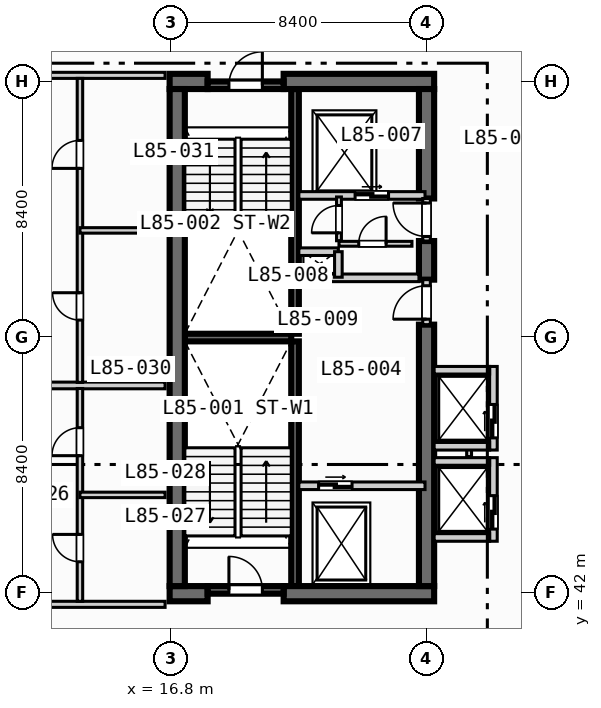
"""IFC4 building model, lengths in metres.
Left out: names, types, materials, properties, quantities, classifications, styles, units other than length and angle.
Written with IfcOpenShell. Run it as: python <this file> out.ifc"""

import sys

from ifc_helpers import new_model, si_unit, direction, frame, frame_2d, origin, place, context, subcontext, project, spatial, rectangle, extrude, element, fill, save


model = new_model("IFC4")
c1 = context("Model", 3, precision=1e-05, world=origin(), true_north=direction((0.0, 1.0)))
c2 = subcontext(c1, "Body", "Model", "MODEL_VIEW")
j1 = project(units=[si_unit("LENGTHUNIT", "METRE"), si_unit("PLANEANGLEUNIT", "RADIAN")], contexts=[c1])
p1 = place(None, origin())
s1 = spatial("IfcSite", under=j1, at=p1, CompositionType="ELEMENT")
p2 = place(p1, origin())
s2 = spatial("IfcBuilding", under=s1, at=p2, CompositionType="ELEMENT")
p3 = place(p2, frame((0.0, 0.0, 343.7)))
s3 = spatial("IfcBuildingStorey", under=s2, at=p3, CompositionType="ELEMENT", Elevation=343.7)
for number, where, z_axis, x_axis in (
    (1, (20.875, 42.2, 0.0), (0.0, 0.0, 1.0), (0.0, 1.0, 0.0)),
    (2, (20.875, 50.5, 0.0), (0.0, 0.0, 1.0), (0.0, 1.0, 0.0)),
):
    element("IfcWall", number, at=place(p3, frame(where, z_axis=z_axis, x_axis=x_axis)), inside=s3, PredefinedType="SOLIDWALL", context=c2, shape_type="SweptSolid", body=[
        extrude(rectangle(XDim=8.05, YDim=0.25, at=frame_2d((4.025, 0.0))), origin(), (0.0, 0.0, 1.0), 3.67),
    ])
p4 = place(p3, frame((17.25, 50.375, 0.0), z_axis=(0.0, 0.0, 1.0), x_axis=(1.0, 0.0, 0.0)))
e3 = element("IfcWall", 3, at=p4, inside=s3, PredefinedType="SOLIDWALL", context=c2, shape_type="SweptSolid", body=[
    extrude(rectangle(XDim=3.5, YDim=0.25, at=frame_2d((1.75, 0.0))), origin(), (0.0, 0.0, 1.0), 3.67),
])
p5 = place(p3, frame((16.75, 41.95, 0.0), z_axis=(0.0, 0.0, 1.0), x_axis=(1.0, 0.0, 0.0)))
e4 = element("IfcWall", 4, at=p5, inside=s3, PredefinedType="SHEAR", context=c2, shape_type="SweptSolid", body=[
    extrude(rectangle(XDim=1.25, YDim=0.5, at=frame_2d((0.625, 0.0))), origin(), (0.0, 0.0, 1.0), 3.67),
])
p6 = place(p3, frame((20.5, 41.95, 0.0), z_axis=(0.0, 0.0, 1.0), x_axis=(1.0, 0.0, 0.0)))
e5 = element("IfcWall", 5, at=p6, inside=s3, PredefinedType="SHEAR", context=c2, shape_type="SweptSolid", body=[
    extrude(rectangle(XDim=4.95, YDim=0.5, at=frame_2d((2.475, 0.0))), origin(), (0.0, 0.0, 1.0), 3.67),
])
p7 = place(p3, frame((16.75, 58.8, 0.0), z_axis=(0.0, 0.0, 1.0), x_axis=(1.0, 0.0, 0.0)))
e6 = element("IfcWall", 6, at=p7, inside=s3, PredefinedType="SHEAR", context=c2, shape_type="SweptSolid", body=[
    extrude(rectangle(XDim=1.25, YDim=0.5, at=frame_2d((0.625, 0.0))), origin(), (0.0, 0.0, 1.0), 3.67),
])
p8 = place(p3, frame((20.5, 58.8, 0.0), z_axis=(0.0, 0.0, 1.0), x_axis=(1.0, 0.0, 0.0)))
e7 = element("IfcWall", 7, at=p8, inside=s3, PredefinedType="SHEAR", context=c2, shape_type="SweptSolid", body=[
    extrude(rectangle(XDim=4.95, YDim=0.5, at=frame_2d((2.475, 0.0))), origin(), (0.0, 0.0, 1.0), 3.67),
])
p9 = place(p3, frame((17.0, 42.2, 0.0), z_axis=(0.0, 0.0, 1.0), x_axis=(0.0, 1.0, 0.0)))
e8 = element("IfcWall", 8, at=p9, inside=s3, PredefinedType="SHEAR", context=c2, shape_type="SweptSolid", body=[
    extrude(rectangle(XDim=16.35, YDim=0.5, at=frame_2d((8.175, 0.0))), origin(), (0.0, 0.0, 1.0), 3.67),
])
p10 = place(p3, frame((25.2, 42.2, 0.0), z_axis=(0.0, 0.0, 1.0), x_axis=(0.0, 1.0, 0.0)))
e9 = element("IfcWall", 9, at=p10, inside=s3, PredefinedType="SHEAR", context=c2, shape_type="SweptSolid", body=[
    extrude(rectangle(XDim=8.6, YDim=0.5, at=frame_2d((4.3, 0.0))), origin(), (0.0, 0.0, 1.0), 3.67),
])
p11 = place(p3, frame((25.2, 52.28, 0.0), z_axis=(0.0, 0.0, 1.0), x_axis=(0.0, 1.0, 0.0)))
e10 = element("IfcWall", 10, at=p11, inside=s3, PredefinedType="SHEAR", context=c2, shape_type="SweptSolid", body=[
    extrude(rectangle(XDim=1.27, YDim=0.5, at=frame_2d((0.635, 0.0))), origin(), (0.0, 0.0, 1.0), 3.67),
])
p12 = place(p3, frame((25.2, 54.95, 0.0), z_axis=(0.0, 0.0, 1.0), x_axis=(0.0, 1.0, 0.0)))
e11 = element("IfcWall", 11, at=p12, inside=s3, PredefinedType="SHEAR", context=c2, shape_type="SweptSolid", body=[
    extrude(rectangle(XDim=3.6, YDim=0.5, at=frame_2d((1.8, 0.0))), origin(), (0.0, 0.0, 1.0), 3.67),
])
p13 = place(p3, frame((18.0, 42.075, 0.0), z_axis=(0.0, 0.0, 1.0), x_axis=(1.0, 0.0, 0.0)))
e12 = element("IfcWall", 12, at=p13, inside=s3, PredefinedType="SOLIDWALL", context=c2, shape_type="SweptSolid", body=[
    extrude(rectangle(XDim=2.5, YDim=0.25, at=frame_2d((1.25, 0.0))), origin(), (0.0, 0.0, 1.0), 3.67),
])
p14 = place(p13, frame((0.7, 0.0, 0.0)))
e13 = element("IfcOpeningElement", 13, at=p14, cuts=e12, PredefinedType="OPENING", context=c2, shape_type="SweptSolid", body=[
    extrude(rectangle(XDim=1.1, YDim=2.15, at=frame_2d((0.55, 1.075))), frame((0.0, 0.135, 0.0), z_axis=(0.0, -1.0, 0.0), x_axis=(1.0, 0.0, 0.0)), (0.0, 0.0, 1.0), 0.27),
])
p15 = place(p3, frame((18.0, 58.675, 0.0), z_axis=(0.0, 0.0, 1.0), x_axis=(1.0, 0.0, 0.0)))
e14 = element("IfcWall", 14, at=p15, inside=s3, PredefinedType="SOLIDWALL", context=c2, shape_type="SweptSolid", body=[
    extrude(rectangle(XDim=2.5, YDim=0.25, at=frame_2d((1.25, 0.0))), origin(), (0.0, 0.0, 1.0), 3.67),
])
p16 = place(p15, frame((0.7, 0.0, 0.0)))
e15 = element("IfcOpeningElement", 15, at=p16, cuts=e14, PredefinedType="OPENING", context=c2, shape_type="SweptSolid", body=[
    extrude(rectangle(XDim=1.1, YDim=2.15, at=frame_2d((0.55, 1.075))), frame((0.0, 0.135, 0.0), z_axis=(0.0, -1.0, 0.0), x_axis=(1.0, 0.0, 0.0)), (0.0, 0.0, 1.0), 0.27),
])
p17 = place(p3, frame((21.0, 45.5, 0.0), z_axis=(0.0, 0.0, 1.0), x_axis=(1.0, 0.0, 0.0)))
e16 = element("IfcWall", 16, at=p17, inside=s3, PredefinedType="SOLIDWALL", context=c2, shape_type="SweptSolid", body=[
    extrude(rectangle(XDim=4.15, YDim=0.25, at=frame_2d((2.075, 0.0))), origin(), (0.0, 0.0, 1.0), 3.67),
])
p18 = place(p17, frame((0.65, 0.0, 0.0)))
e17 = element("IfcOpeningElement", 17, at=p18, cuts=e16, PredefinedType="OPENING", context=c2, shape_type="SweptSolid", body=[
    extrude(rectangle(XDim=1.1, YDim=2.15, at=frame_2d((0.55, 1.075))), frame((0.0, 0.135, 0.0), z_axis=(0.0, -1.0, 0.0), x_axis=(1.0, 0.0, 0.0)), (0.0, 0.0, 1.0), 0.27),
])
p19 = place(p3, frame((25.2, 50.8, 0.0), z_axis=(0.0, 0.0, 1.0), x_axis=(0.0, 1.0, 0.0)))
e18 = element("IfcWall", 18, at=p19, inside=s3, PredefinedType="SOLIDWALL", context=c2, shape_type="SweptSolid", body=[
    extrude(rectangle(XDim=1.48, YDim=0.25, at=frame_2d((0.74, 0.0))), origin(), (0.0, 0.0, 1.0), 3.67),
])
p20 = place(p19, frame((0.18, 0.0, 0.0)))
e19 = element("IfcOpeningElement", 19, at=p20, cuts=e18, PredefinedType="OPENING", context=c2, shape_type="SweptSolid", body=[
    extrude(rectangle(XDim=1.1, YDim=2.15, at=frame_2d((0.55, 1.075))), frame((0.0, 0.135, 0.0), z_axis=(0.0, -1.0, 0.0), x_axis=(1.0, 0.0, 0.0)), (0.0, 0.0, 1.0), 0.27),
])
p21 = place(p3, frame((21.0, 52.34, 0.0), z_axis=(0.0, 0.0, 1.0), x_axis=(1.0, 0.0, 0.0)))
e20 = element("IfcWall", 20, at=p21, inside=s3, PredefinedType="SOLIDWALL", context=c2, shape_type="SweptSolid", body=[
    extrude(rectangle(XDim=3.95, YDim=0.25, at=frame_2d((1.975, 0.0))), origin(), (0.0, 0.0, 1.0), 3.67),
])
p22 = place(p3, frame((21.0, 55.05, 0.0), z_axis=(0.0, 0.0, 1.0), x_axis=(1.0, 0.0, 0.0)))
e21 = element("IfcWall", 21, at=p22, inside=s3, PredefinedType="SOLIDWALL", context=c2, shape_type="SweptSolid", body=[
    extrude(rectangle(XDim=4.15, YDim=0.25, at=frame_2d((2.075, 0.0))), origin(), (0.0, 0.0, 1.0), 3.67),
])
p23 = place(p22, frame((1.85, 0.0, 0.0)))
e22 = element("IfcOpeningElement", 22, at=p23, cuts=e21, PredefinedType="OPENING", context=c2, shape_type="SweptSolid", body=[
    extrude(rectangle(XDim=1.1, YDim=2.15, at=frame_2d((0.55, 1.075))), frame((0.0, 0.135, 0.0), z_axis=(0.0, -1.0, 0.0), x_axis=(1.0, 0.0, 0.0)), (0.0, 0.0, 1.0), 0.27),
])
p24 = place(p3, frame((25.2, 53.55, 0.0), z_axis=(0.0, 0.0, 1.0), x_axis=(0.0, 1.0, 0.0)))
e23 = element("IfcWall", 23, at=p24, inside=s3, PredefinedType="SOLIDWALL", context=c2, shape_type="SweptSolid", body=[
    extrude(rectangle(XDim=1.4, YDim=0.25, at=frame_2d((0.7, 0.0))), origin(), (0.0, 0.0, 1.0), 3.67),
])
p25 = place(p24, frame((0.15, 0.0, 0.0)))
e24 = element("IfcOpeningElement", 24, at=p25, cuts=e23, PredefinedType="OPENING", context=c2, shape_type="SweptSolid", body=[
    extrude(rectangle(XDim=1.1, YDim=2.15, at=frame_2d((0.55, 1.075))), frame((0.0, 0.135, 0.0), z_axis=(0.0, -1.0, 0.0), x_axis=(1.0, 0.0, 0.0)), (0.0, 0.0, 1.0), 0.27),
])
p26 = place(p3, frame((21.0, 53.2, 0.0), z_axis=(0.0, 0.0, 1.0), x_axis=(1.0, 0.0, 0.0)))
e25 = element("IfcWall", 25, at=p26, inside=s3, PredefinedType="SOLIDWALL", context=c2, shape_type="SweptSolid", body=[
    extrude(rectangle(XDim=1.3, YDim=0.25, at=frame_2d((0.65, 0.0))), origin(), (0.0, 0.0, 1.0), 3.67),
])
p27 = place(p3, frame((22.3, 52.36, 0.0), z_axis=(0.0, 0.0, 1.0), x_axis=(0.0, 1.0, 0.0)))
e26 = element("IfcWall", 26, at=p27, inside=s3, PredefinedType="SOLIDWALL", context=c2, shape_type="SweptSolid", body=[
    extrude(rectangle(XDim=0.84, YDim=0.25, at=frame_2d((0.42, 0.0))), origin(), (0.0, 0.0, 1.0), 3.67),
])
p28 = place(p3, frame((22.32, 53.56, 0.0), z_axis=(0.0, 0.0, 1.0), x_axis=(0.0, 1.0, 0.0)))
e27 = element("IfcWall", 27, at=p28, inside=s3, PredefinedType="PARTITIONING", context=c2, shape_type="SweptSolid", body=[
    extrude(rectangle(XDim=1.44, YDim=0.16, at=frame_2d((0.72, 0.0))), origin(), (0.0, 0.0, 1.0), 3.67),
])
p29 = place(p28, frame((0.26, 0.0, 0.0)))
e28 = element("IfcOpeningElement", 28, at=p29, cuts=e27, PredefinedType="OPENING", context=c2, shape_type="SweptSolid", body=[
    extrude(rectangle(XDim=0.9, YDim=2.1, at=frame_2d((0.45, 1.05))), frame((0.0, 0.09, 0.0), z_axis=(0.0, -1.0, 0.0), x_axis=(1.0, 0.0, 0.0)), (0.0, 0.0, 1.0), 0.18),
])
p30 = place(p3, frame((22.32, 53.46, 0.0), z_axis=(0.0, 0.0, 1.0), x_axis=(1.0, 0.0, 0.0)))
e29 = element("IfcWall", 29, at=p30, inside=s3, PredefinedType="PARTITIONING", context=c2, shape_type="SweptSolid", body=[
    extrude(rectangle(XDim=2.4, YDim=0.16, at=frame_2d((1.2, 0.0))), origin(), (0.0, 0.0, 1.0), 3.67),
])
p31 = place(p30, frame((0.65, 0.0, 0.0)))
e30 = element("IfcOpeningElement", 30, at=p31, cuts=e29, PredefinedType="OPENING", context=c2, shape_type="SweptSolid", body=[
    extrude(rectangle(XDim=0.9, YDim=2.1, at=frame_2d((0.45, 1.05))), frame((0.0, 0.09, 0.0), z_axis=(0.0, -1.0, 0.0), x_axis=(1.0, 0.0, 0.0)), (0.0, 0.0, 1.0), 0.18),
])
p32 = place(p3, frame((27.4, 43.675, 0.0), z_axis=(0.0, 0.0, 1.0), x_axis=(0.0, 1.0, 0.0)))
e31 = element("IfcWall", 31, at=p32, inside=s3, PredefinedType="SOLIDWALL", context=c2, shape_type="SweptSolid", body=[
    extrude(rectangle(XDim=2.75, YDim=0.25, at=frame_2d((1.375, 0.0))), origin(), (0.0, 0.0, 1.0), 3.67),
])
p33 = place(p32, frame((0.4, 0.0, 0.0)))
e32 = element("IfcOpeningElement", 32, at=p33, cuts=e31, PredefinedType="OPENING", context=c2, shape_type="SweptSolid", body=[
    extrude(rectangle(XDim=1.1, YDim=2.15, at=frame_2d((0.55, 1.075))), frame((0.0, 0.135, 0.0), z_axis=(0.0, -1.0, 0.0), x_axis=(1.0, 0.0, 0.0)), (0.0, 0.0, 1.0), 0.27),
])
for number, where, z_axis, x_axis in (
    (33, (25.45, 43.8, 0.0), (0.0, 0.0, 1.0), (1.0, 0.0, 0.0)),
    (34, (25.45, 46.3, 0.0), (0.0, 0.0, 1.0), (1.0, 0.0, 0.0)),
):
    element("IfcWall", number, at=place(p3, frame(where, z_axis=z_axis, x_axis=x_axis)), inside=s3, PredefinedType="SOLIDWALL", context=c2, shape_type="SweptSolid", body=[
        extrude(rectangle(XDim=1.825, YDim=0.25, at=frame_2d((0.913, 0.0))), origin(), (0.0, 0.0, 1.0), 3.67),
    ])
p34 = place(p3, frame((26.6, 46.46, 0.0), z_axis=(0.0, 0.0, 1.0), x_axis=(0.0, 1.0, 0.0)))
e35 = element("IfcWall", 35, at=p34, inside=s3, PredefinedType="PARTITIONING", context=c2, shape_type="SweptSolid", body=[
    extrude(rectangle(XDim=0.88, YDim=0.16, at=frame_2d((0.44, 0.0))), origin(), (0.0, 0.0, 1.0), 3.67),
])
p35 = place(p3, frame((27.4, 46.675, 0.0), z_axis=(0.0, 0.0, 1.0), x_axis=(0.0, 1.0, 0.0)))
e36 = element("IfcWall", 36, at=p35, inside=s3, PredefinedType="SOLIDWALL", context=c2, shape_type="SweptSolid", body=[
    extrude(rectangle(XDim=2.75, YDim=0.25, at=frame_2d((1.375, 0.0))), origin(), (0.0, 0.0, 1.0), 3.67),
])
p36 = place(p35, frame((0.4, 0.0, 0.0)))
e37 = element("IfcOpeningElement", 37, at=p36, cuts=e36, PredefinedType="OPENING", context=c2, shape_type="SweptSolid", body=[
    extrude(rectangle(XDim=1.1, YDim=2.15, at=frame_2d((0.55, 1.075))), frame((0.0, 0.135, 0.0), z_axis=(0.0, -1.0, 0.0), x_axis=(1.0, 0.0, 0.0)), (0.0, 0.0, 1.0), 0.27),
])
for number, where, z_axis, x_axis in (
    (38, (25.45, 46.8, 0.0), (0.0, 0.0, 1.0), (1.0, 0.0, 0.0)),
    (39, (25.45, 49.3, 0.0), (0.0, 0.0, 1.0), (1.0, 0.0, 0.0)),
):
    element("IfcWall", number, at=place(p3, frame(where, z_axis=z_axis, x_axis=x_axis)), inside=s3, PredefinedType="SOLIDWALL", context=c2, shape_type="SweptSolid", body=[
        extrude(rectangle(XDim=1.825, YDim=0.25, at=frame_2d((0.913, 0.0))), origin(), (0.0, 0.0, 1.0), 3.67),
    ])
p37 = place(p3, frame((8.65, 41.6, 0.0), z_axis=(0.0, 0.0, 1.0), x_axis=(1.0, 0.0, 0.0)))
e40 = element("IfcWall", 40, at=p37, inside=s3, PredefinedType="PARTITIONING", context=c2, shape_type="SweptSolid", body=[
    extrude(rectangle(XDim=7.95, YDim=0.2, at=frame_2d((3.975, 0.0))), origin(), (0.0, 0.0, 1.0), 3.67),
])
p38 = place(p37, frame((2.0, 0.0, 0.0)))
e41 = element("IfcOpeningElement", 41, at=p38, cuts=e40, PredefinedType="OPENING", context=c2, shape_type="SweptSolid", body=[
    extrude(rectangle(XDim=1.0, YDim=2.15, at=frame_2d((0.5, 1.075))), frame((0.0, 0.11, 0.0), z_axis=(0.0, -1.0, 0.0), x_axis=(1.0, 0.0, 0.0)), (0.0, 0.0, 1.0), 0.22),
])
p39 = place(p3, frame((8.65, 59.0, 0.0), z_axis=(0.0, 0.0, 1.0), x_axis=(1.0, 0.0, 0.0)))
e42 = element("IfcWall", 42, at=p39, inside=s3, PredefinedType="PARTITIONING", context=c2, shape_type="SweptSolid", body=[
    extrude(rectangle(XDim=7.95, YDim=0.2, at=frame_2d((3.975, 0.0))), origin(), (0.0, 0.0, 1.0), 3.053),
])
p40 = place(p39, frame((2.0, 0.0, 0.0)))
e43 = element("IfcOpeningElement", 43, at=p40, cuts=e42, PredefinedType="OPENING", context=c2, shape_type="SweptSolid", body=[
    extrude(rectangle(XDim=1.0, YDim=2.15, at=frame_2d((0.5, 1.075))), frame((0.0, 0.11, 0.0), z_axis=(0.0, -1.0, 0.0), x_axis=(1.0, 0.0, 0.0)), (0.0, 0.0, 1.0), 0.22),
])
p41 = place(p3, frame((8.65, 48.8, 0.0), z_axis=(0.0, 0.0, 1.0), x_axis=(1.0, 0.0, 0.0)))
e44 = element("IfcWall", 44, at=p41, inside=s3, PredefinedType="PARTITIONING", context=c2, shape_type="SweptSolid", body=[
    extrude(rectangle(XDim=7.95, YDim=0.22, at=frame_2d((3.975, 0.0))), origin(), (0.0, 0.0, 1.0), 3.67),
])
p42 = place(p3, frame((13.8, 41.7, 0.0), z_axis=(0.0, 0.0, 1.0), x_axis=(0.0, 1.0, 0.0)))
e45 = element("IfcWall", 45, at=p42, inside=s3, PredefinedType="PLUMBINGWALL", context=c2, shape_type="SweptSolid", body=[
    extrude(rectangle(XDim=7.0, YDim=0.18, at=frame_2d((3.5, 0.0))), origin(), (0.0, 0.0, 1.0), 3.67),
])
p43 = place(p42, frame((1.3, 0.0, 0.0)))
e46 = element("IfcOpeningElement", 46, at=p43, cuts=e45, PredefinedType="OPENING", context=c2, shape_type="SweptSolid", body=[
    extrude(rectangle(XDim=0.9, YDim=2.1, at=frame_2d((0.45, 1.05))), frame((0.0, 0.1, 0.0), z_axis=(0.0, -1.0, 0.0), x_axis=(1.0, 0.0, 0.0)), (0.0, 0.0, 1.0), 0.2),
])
p44 = place(p42, frame((4.79, 0.0, 0.0)))
e47 = element("IfcOpeningElement", 47, at=p44, cuts=e45, PredefinedType="OPENING", context=c2, shape_type="SweptSolid", body=[
    extrude(rectangle(XDim=0.92, YDim=2.1, at=frame_2d((0.46, 1.05))), frame((0.0, 0.1, 0.0), z_axis=(0.0, -1.0, 0.0), x_axis=(1.0, 0.0, 0.0)), (0.0, 0.0, 1.0), 0.2),
])
p45 = place(p3, frame((13.8, 45.2, 0.0), z_axis=(0.0, 0.0, 1.0), x_axis=(1.0, 0.0, 0.0)))
e48 = element("IfcWall", 48, at=p45, inside=s3, PredefinedType="PLUMBINGWALL", context=c2, shape_type="SweptSolid", body=[
    extrude(rectangle(XDim=2.8, YDim=0.18, at=frame_2d((1.4, 0.0))), origin(), (0.0, 0.0, 1.0), 3.67),
])
p46 = place(p3, frame((13.8, 48.9, 0.0), z_axis=(0.0, 0.0, 1.0), x_axis=(0.0, 1.0, 0.0)))
e49 = element("IfcWall", 49, at=p46, inside=s3, PredefinedType="PLUMBINGWALL", context=c2, shape_type="SweptSolid", body=[
    extrude(rectangle(XDim=10.0, YDim=0.18, at=frame_2d((5.0, 0.0))), origin(), (0.0, 0.0, 1.0), 3.67),
])
p47 = place(p46, frame((2.05, 0.0, 0.0)))
e50 = element("IfcOpeningElement", 50, at=p47, cuts=e49, PredefinedType="OPENING", context=c2, shape_type="SweptSolid", body=[
    extrude(rectangle(XDim=0.9, YDim=2.1, at=frame_2d((0.45, 1.05))), frame((0.0, 0.1, 0.0), z_axis=(0.0, -1.0, 0.0), x_axis=(1.0, 0.0, 0.0)), (0.0, 0.0, 1.0), 0.2),
])
p48 = place(p46, frame((7.04, 0.0, 0.0)))
e51 = element("IfcOpeningElement", 51, at=p48, cuts=e49, PredefinedType="OPENING", context=c2, shape_type="SweptSolid", body=[
    extrude(rectangle(XDim=0.92, YDim=2.1, at=frame_2d((0.46, 1.05))), frame((0.0, 0.1, 0.0), z_axis=(0.0, -1.0, 0.0), x_axis=(1.0, 0.0, 0.0)), (0.0, 0.0, 1.0), 0.2),
])
p49 = place(p3, frame((13.8, 53.9, 0.0), z_axis=(0.0, 0.0, 1.0), x_axis=(1.0, 0.0, 0.0)))
e52 = element("IfcWall", 52, at=p49, inside=s3, PredefinedType="PLUMBINGWALL", context=c2, shape_type="SweptSolid", body=[
    extrude(rectangle(XDim=2.8, YDim=0.18, at=frame_2d((1.4, 0.0))), origin(), (0.0, 0.0, 1.0), 3.67),
])
p50 = place(p14, origin())
e53 = element("IfcDoor", 53, at=p50, inside=s3, OperationType="SINGLE_SWING_LEFT", PredefinedType="DOOR", context=c2, shape_type="SweptSolid", body=[
    extrude(rectangle(XDim=1.1, YDim=2.15, at=frame_2d((0.55, 1.075))), frame((0.0, 0.025, 0.0), z_axis=(0.0, -1.0, 0.0), x_axis=(1.0, 0.0, 0.0)), (0.0, 0.0, 1.0), 0.05),
])
fill(e13, e53)
p51 = place(p16, origin())
e54 = element("IfcDoor", 54, at=p51, inside=s3, OperationType="SINGLE_SWING_RIGHT", PredefinedType="DOOR", context=c2, shape_type="SweptSolid", body=[
    extrude(rectangle(XDim=1.1, YDim=2.15, at=frame_2d((0.55, 1.075))), frame((0.0, 0.025, 0.0), z_axis=(0.0, -1.0, 0.0), x_axis=(1.0, 0.0, 0.0)), (0.0, 0.0, 1.0), 0.05),
])
fill(e15, e54)
p52 = place(p18, origin())
e55 = element("IfcDoor", 55, at=p52, inside=s3, OperationType="SLIDING_TO_LEFT", PredefinedType="DOOR", context=c2, shape_type="SweptSolid", body=[
    extrude(rectangle(XDim=1.1, YDim=2.15, at=frame_2d((0.55, 1.075))), frame((0.0, 0.025, 0.0), z_axis=(0.0, -1.0, 0.0), x_axis=(1.0, 0.0, 0.0)), (0.0, 0.0, 1.0), 0.05),
])
fill(e17, e55)
p53 = place(p20, origin())
e56 = element("IfcDoor", 56, at=p53, inside=s3, OperationType="SINGLE_SWING_LEFT", PredefinedType="DOOR", context=c2, shape_type="SweptSolid", body=[
    extrude(rectangle(XDim=1.1, YDim=2.15, at=frame_2d((0.55, 1.075))), frame((0.0, 0.025, 0.0), z_axis=(0.0, -1.0, 0.0), x_axis=(1.0, 0.0, 0.0)), (0.0, 0.0, 1.0), 0.05),
])
fill(e19, e56)
p54 = place(p23, origin())
e57 = element("IfcDoor", 57, at=p54, inside=s3, OperationType="SLIDING_TO_LEFT", PredefinedType="DOOR", context=c2, shape_type="SweptSolid", body=[
    extrude(rectangle(XDim=1.1, YDim=2.15, at=frame_2d((0.55, 1.075))), frame((0.0, 0.025, 0.0), z_axis=(0.0, -1.0, 0.0), x_axis=(1.0, 0.0, 0.0)), (0.0, 0.0, 1.0), 0.05),
])
fill(e22, e57)
p55 = place(p25, origin())
e58 = element("IfcDoor", 58, at=p55, inside=s3, OperationType="SINGLE_SWING_RIGHT", PredefinedType="DOOR", context=c2, shape_type="SweptSolid", body=[
    extrude(rectangle(XDim=1.1, YDim=2.15, at=frame_2d((0.55, 1.075))), frame((0.0, 0.025, 0.0), z_axis=(0.0, -1.0, 0.0), x_axis=(1.0, 0.0, 0.0)), (0.0, 0.0, 1.0), 0.05),
])
fill(e24, e58)
p56 = place(p29, origin())
e59 = element("IfcDoor", 59, at=p56, inside=s3, OperationType="SINGLE_SWING_LEFT", PredefinedType="DOOR", context=c2, shape_type="SweptSolid", body=[
    extrude(rectangle(XDim=0.9, YDim=2.1, at=frame_2d((0.45, 1.05))), frame((0.0, 0.025, 0.0), z_axis=(0.0, -1.0, 0.0), x_axis=(1.0, 0.0, 0.0)), (0.0, 0.0, 1.0), 0.05),
])
fill(e28, e59)
p57 = place(p31, origin())
e60 = element("IfcDoor", 60, at=p57, inside=s3, OperationType="SINGLE_SWING_RIGHT", PredefinedType="DOOR", context=c2, shape_type="SweptSolid", body=[
    extrude(rectangle(XDim=0.9, YDim=2.1, at=frame_2d((0.45, 1.05))), frame((0.0, 0.025, 0.0), z_axis=(0.0, -1.0, 0.0), x_axis=(1.0, 0.0, 0.0)), (0.0, 0.0, 1.0), 0.05),
])
fill(e30, e60)
p58 = place(p33, origin())
e61 = element("IfcDoor", 61, at=p58, inside=s3, OperationType="SLIDING_TO_LEFT", PredefinedType="DOOR", context=c2, shape_type="SweptSolid", body=[
    extrude(rectangle(XDim=1.1, YDim=2.15, at=frame_2d((0.55, 1.075))), frame((0.0, 0.025, 0.0), z_axis=(0.0, -1.0, 0.0), x_axis=(1.0, 0.0, 0.0)), (0.0, 0.0, 1.0), 0.05),
])
fill(e32, e61)
p59 = place(p36, origin())
e62 = element("IfcDoor", 62, at=p59, inside=s3, OperationType="SLIDING_TO_LEFT", PredefinedType="DOOR", context=c2, shape_type="SweptSolid", body=[
    extrude(rectangle(XDim=1.1, YDim=2.15, at=frame_2d((0.55, 1.075))), frame((0.0, 0.025, 0.0), z_axis=(0.0, -1.0, 0.0), x_axis=(1.0, 0.0, 0.0)), (0.0, 0.0, 1.0), 0.05),
])
fill(e37, e62)
p60 = place(p43, origin())
e63 = element("IfcDoor", 63, at=p60, inside=s3, OperationType="SINGLE_SWING_RIGHT", PredefinedType="DOOR", context=c2, shape_type="SweptSolid", body=[
    extrude(rectangle(XDim=0.9, YDim=2.1, at=frame_2d((0.45, 1.05))), frame((0.0, 0.025, 0.0), z_axis=(0.0, -1.0, 0.0), x_axis=(1.0, 0.0, 0.0)), (0.0, 0.0, 1.0), 0.05),
])
fill(e46, e63)
p61 = place(p44, origin())
e64 = element("IfcDoor", 64, at=p61, inside=s3, OperationType="SINGLE_SWING_LEFT", PredefinedType="DOOR", context=c2, shape_type="SweptSolid", body=[
    extrude(rectangle(XDim=0.92, YDim=2.1, at=frame_2d((0.46, 1.05))), frame((0.0, 0.025, 0.0), z_axis=(0.0, -1.0, 0.0), x_axis=(1.0, 0.0, 0.0)), (0.0, 0.0, 1.0), 0.05),
])
fill(e47, e64)
p62 = place(p47, origin())
e65 = element("IfcDoor", 65, at=p62, inside=s3, OperationType="SINGLE_SWING_RIGHT", PredefinedType="DOOR", context=c2, shape_type="SweptSolid", body=[
    extrude(rectangle(XDim=0.9, YDim=2.1, at=frame_2d((0.45, 1.05))), frame((0.0, 0.025, 0.0), z_axis=(0.0, -1.0, 0.0), x_axis=(1.0, 0.0, 0.0)), (0.0, 0.0, 1.0), 0.05),
])
fill(e50, e65)
p63 = place(p48, origin())
e66 = element("IfcDoor", 66, at=p63, inside=s3, OperationType="SINGLE_SWING_LEFT", PredefinedType="DOOR", context=c2, shape_type="SweptSolid", body=[
    extrude(rectangle(XDim=0.92, YDim=2.1, at=frame_2d((0.46, 1.05))), frame((0.0, 0.025, 0.0), z_axis=(0.0, -1.0, 0.0), x_axis=(1.0, 0.0, 0.0)), (0.0, 0.0, 1.0), 0.05),
])
fill(e51, e66)
save(model, sys.argv[1])
